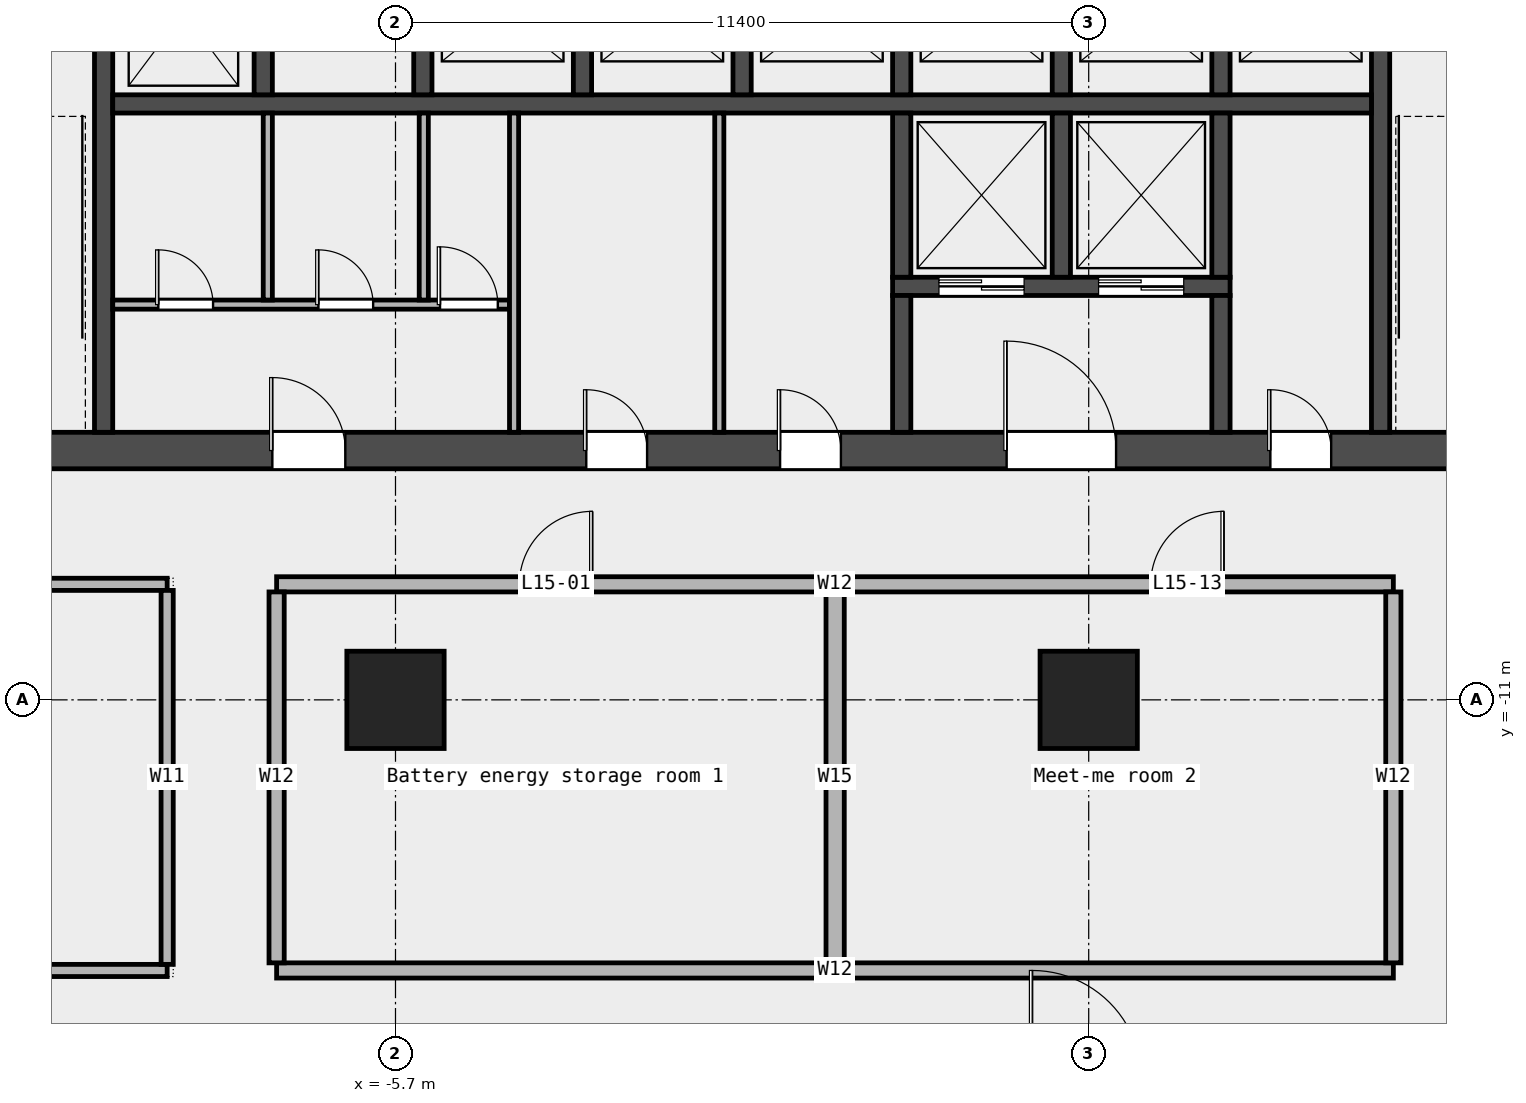
"""IFC4 building model, lengths in metres.
Left out: names, types, materials, properties, quantities, classifications, styles, units other than length and angle.
Written with IfcOpenShell. Run it as: python <this file> out.ifc"""

import sys

from ifc_helpers import new_model, si_unit, direction, frame, frame_2d, origin, origin_2d, place, context, subcontext, project, spatial, rectangle, extrude, element, fill, save


model = new_model("IFC4")
c1 = context("Model", 3, precision=1e-05, world=origin(), true_north=direction((0.0, 1.0)))
c2 = subcontext(c1, "Body", "Model", "MODEL_VIEW")
j1 = project(units=[si_unit("LENGTHUNIT", "METRE"), si_unit("PLANEANGLEUNIT", "RADIAN")], contexts=[c1])
p1 = place(None, origin())
s1 = spatial("IfcSite", under=j1, at=p1, CompositionType="ELEMENT")
p2 = place(p1, origin())
s2 = spatial("IfcBuilding", under=s1, at=p2, CompositionType="ELEMENT")
p3 = place(p2, frame((0.0, 0.0, 79.0)))
s3 = spatial("IfcBuildingStorey", under=s2, at=p3, CompositionType="ELEMENT", Elevation=79.0)
for number, where, z_axis, x_axis in (
    (1, (-5.7, -11.0, 0.0), (0.0, 0.0, 1.0), (1.0, 0.0, 0.0)),
    (2, (5.7, -11.0, 0.0), (0.0, 0.0, 1.0), (1.0, 0.0, 0.0)),
):
    element("IfcColumn", number, at=place(p3, frame(where, z_axis=z_axis, x_axis=x_axis)), inside=s3, PredefinedType="COLUMN", context=c2, shape_type="SweptSolid", body=[
        extrude(rectangle(XDim=1.6, YDim=1.6, at=origin_2d()), origin(), (0.0, 0.0, 1.0), 4.35),
    ])
p4 = place(p3, frame((-24.525, -15.45, 0.0), z_axis=(0.0, 0.0, 1.0), x_axis=(1.0, 0.0, 0.0)))
e3 = element("IfcWall", 3, at=p4, inside=s3, PredefinedType="PARTITIONING", context=c2, shape_type="SweptSolid", body=[
    extrude(rectangle(XDim=15.07, YDim=0.2, at=frame_2d((7.535, 0.0))), origin(), (0.0, 0.0, 1.0), 4.35),
])
p5 = place(p4, frame((6.785, 0.0, 0.0)))
e4 = element("IfcOpeningElement", 4, at=p5, cuts=e3, PredefinedType="OPENING", context=c2, shape_type="SweptSolid", body=[
    extrude(rectangle(XDim=1.5, YDim=2.1, at=frame_2d((0.75, 1.05))), frame((0.0, 0.112, 0.0), z_axis=(0.0, -1.0, 0.0), x_axis=(1.0, 0.0, 0.0)), (0.0, 0.0, 1.0), 0.224),
])
p6 = place(p3, frame((-7.655, -15.45, 0.0), z_axis=(0.0, 0.0, 1.0), x_axis=(1.0, 0.0, 0.0)))
e5 = element("IfcWall", 5, at=p6, inside=s3, PredefinedType="PARTITIONING", context=c2, shape_type="SweptSolid", body=[
    extrude(rectangle(XDim=18.365, YDim=0.25, at=frame_2d((9.183, 0.0))), origin(), (0.0, 0.0, 1.0), 4.35),
])
p7 = place(p3, frame((-16.3, -9.1, 0.0), z_axis=(0.0, 0.0, 1.0), x_axis=(1.0, 0.0, 0.0)))
e6 = element("IfcWall", 6, at=p7, inside=s3, PredefinedType="PARTITIONING", context=c2, shape_type="SweptSolid", body=[
    extrude(rectangle(XDim=6.845, YDim=0.2, at=frame_2d((3.422, 0.0))), origin(), (0.0, 0.0, 1.0), 4.35),
])
p8 = place(p3, frame((-7.655, -9.1, 0.0), z_axis=(0.0, 0.0, 1.0), x_axis=(1.0, 0.0, 0.0)))
e7 = element("IfcWall", 7, at=p8, inside=s3, PredefinedType="PARTITIONING", context=c2, shape_type="SweptSolid", body=[
    extrude(rectangle(XDim=18.365, YDim=0.25, at=frame_2d((9.183, 0.0))), origin(), (0.0, 0.0, 1.0), 4.35),
])
p9 = place(p8, frame((3.992, 0.0, 0.0)))
e8 = element("IfcOpeningElement", 8, at=p9, cuts=e7, PredefinedType="OPENING", context=c2, shape_type="SweptSolid", body=[
    extrude(rectangle(XDim=1.2, YDim=2.1, at=frame_2d((0.6, 1.05))), frame((0.0, 0.137, 0.0), z_axis=(0.0, -1.0, 0.0), x_axis=(1.0, 0.0, 0.0)), (0.0, 0.0, 1.0), 0.274),
])
p10 = place(p8, frame((14.375, 0.0, 0.0)))
e9 = element("IfcOpeningElement", 9, at=p10, cuts=e7, PredefinedType="OPENING", context=c2, shape_type="SweptSolid", body=[
    extrude(rectangle(XDim=1.2, YDim=2.1, at=frame_2d((0.6, 1.05))), frame((0.0, 0.137, 0.0), z_axis=(0.0, -1.0, 0.0), x_axis=(1.0, 0.0, 0.0)), (0.0, 0.0, 1.0), 0.274),
])
p11 = place(p3, frame((-9.455, -15.35, 0.0), z_axis=(0.0, 0.0, 1.0), x_axis=(0.0, 1.0, 0.0)))
e10 = element("IfcWall", 10, at=p11, inside=s3, PredefinedType="PARTITIONING", context=c2, shape_type="SweptSolid", body=[
    extrude(rectangle(XDim=6.15, YDim=0.2, at=frame_2d((3.075, 0.0))), origin(), (0.0, 0.0, 1.0), 4.35),
])
p12 = place(p3, frame((-7.655, -15.325, 0.0), z_axis=(0.0, 0.0, 1.0), x_axis=(0.0, 1.0, 0.0)))
e11 = element("IfcWall", 11, at=p12, inside=s3, PredefinedType="PARTITIONING", context=c2, shape_type="SweptSolid", body=[
    extrude(rectangle(XDim=6.1, YDim=0.25, at=frame_2d((3.05, 0.0))), origin(), (0.0, 0.0, 1.0), 4.35),
])
p13 = place(p3, frame((1.53, -15.325, 0.0), z_axis=(0.0, 0.0, 1.0), x_axis=(0.0, 1.0, 0.0)))
e12 = element("IfcWall", 12, at=p13, inside=s3, PredefinedType="PARTITIONING", context=c2, shape_type="SweptSolid", body=[
    extrude(rectangle(XDim=6.1, YDim=0.3, at=frame_2d((3.05, 0.0))), origin(), (0.0, 0.0, 1.0), 4.35),
])
p14 = place(p3, frame((10.71, -15.325, 0.0), z_axis=(0.0, 0.0, 1.0), x_axis=(0.0, 1.0, 0.0)))
e13 = element("IfcWall", 13, at=p14, inside=s3, PredefinedType="PARTITIONING", context=c2, shape_type="SweptSolid", body=[
    extrude(rectangle(XDim=6.1, YDim=0.25, at=frame_2d((3.05, 0.0))), origin(), (0.0, 0.0, 1.0), 4.35),
])
p15 = place(p3, frame((-14.4, -6.9, 0.0), z_axis=(0.0, 0.0, 1.0), x_axis=(1.0, 0.0, 0.0)))
e14 = element("IfcWall", 14, at=p15, inside=s3, PredefinedType="SHEAR", context=c2, shape_type="SweptSolid", body=[
    extrude(rectangle(XDim=28.8, YDim=0.6, at=frame_2d((14.4, 0.0))), origin(), (0.0, 0.0, 1.0), 4.5),
])
p16 = place(p15, frame((6.675, 0.0, 0.0)))
e15 = element("IfcOpeningElement", 15, at=p16, cuts=e14, PredefinedType="OPENING", context=c2, shape_type="SweptSolid", body=[
    extrude(rectangle(XDim=1.2, YDim=2.1, at=frame_2d((0.6, 1.05))), frame((0.0, 0.312, 0.0), z_axis=(0.0, -1.0, 0.0), x_axis=(1.0, 0.0, 0.0)), (0.0, 0.0, 1.0), 0.624),
])
p17 = place(p15, frame((11.837, 0.0, 0.0)))
e16 = element("IfcOpeningElement", 16, at=p17, cuts=e14, PredefinedType="OPENING", context=c2, shape_type="SweptSolid", body=[
    extrude(rectangle(XDim=1.0, YDim=2.1, at=frame_2d((0.5, 1.05))), frame((0.0, 0.312, 0.0), z_axis=(0.0, -1.0, 0.0), x_axis=(1.0, 0.0, 0.0)), (0.0, 0.0, 1.0), 0.624),
])
p18 = place(p15, frame((15.025, 0.0, 0.0)))
e17 = element("IfcOpeningElement", 17, at=p18, cuts=e14, PredefinedType="OPENING", context=c2, shape_type="SweptSolid", body=[
    extrude(rectangle(XDim=1.0, YDim=2.1, at=frame_2d((0.5, 1.05))), frame((0.0, 0.312, 0.0), z_axis=(0.0, -1.0, 0.0), x_axis=(1.0, 0.0, 0.0)), (0.0, 0.0, 1.0), 0.624),
])
p19 = place(p15, frame((18.75, 0.0, 0.0)))
e18 = element("IfcOpeningElement", 18, at=p19, cuts=e14, PredefinedType="OPENING", context=c2, shape_type="SweptSolid", body=[
    extrude(rectangle(XDim=1.8, YDim=2.1, at=frame_2d((0.9, 1.05))), frame((0.0, 0.312, 0.0), z_axis=(0.0, -1.0, 0.0), x_axis=(1.0, 0.0, 0.0)), (0.0, 0.0, 1.0), 0.624),
])
p20 = place(p15, frame((23.087, 0.0, 0.0)))
e19 = element("IfcOpeningElement", 19, at=p20, cuts=e14, PredefinedType="OPENING", context=c2, shape_type="SweptSolid", body=[
    extrude(rectangle(XDim=1.0, YDim=2.1, at=frame_2d((0.5, 1.05))), frame((0.0, 0.312, 0.0), z_axis=(0.0, -1.0, 0.0), x_axis=(1.0, 0.0, 0.0)), (0.0, 0.0, 1.0), 0.624),
])
for number, where, z_axis, x_axis in (
    (20, (-10.5, -6.6, 0.0), (0.0, 0.0, 1.0), (0.0, 1.0, 0.0)),
    (21, (10.5, -6.6, 0.0), (0.0, 0.0, 1.0), (0.0, 1.0, 0.0)),
):
    element("IfcWall", number, at=place(p3, frame(where, z_axis=z_axis, x_axis=x_axis)), inside=s3, PredefinedType="SHEAR", context=c2, shape_type="SweptSolid", body=[
        extrude(rectangle(XDim=8.55, YDim=0.3, at=frame_2d((4.275, 0.0))), origin(), (0.0, 0.0, 1.0), 4.5),
    ])
p21 = place(p3, frame((-10.35, -1.2, 0.0), z_axis=(0.0, 0.0, 1.0), x_axis=(1.0, 0.0, 0.0)))
e22 = element("IfcWall", 22, at=p21, inside=s3, PredefinedType="SOLIDWALL", context=c2, shape_type="SweptSolid", body=[
    extrude(rectangle(XDim=20.7, YDim=0.3, at=frame_2d((10.35, 0.0))), origin(), (0.0, 0.0, 1.0), 4.5),
])
for number, where, z_axis, x_axis in (
    (23, (-7.875, -1.05, 0.0), (0.0, 0.0, 1.0), (0.0, 1.0, 0.0)),
    (24, (-5.25, -1.05, 0.0), (0.0, 0.0, 1.0), (0.0, 1.0, 0.0)),
    (25, (-2.625, -1.05, 0.0), (0.0, 0.0, 1.0), (0.0, 1.0, 0.0)),
    (26, (0.0, -1.05, 0.0), (0.0, 0.0, 1.0), (0.0, 1.0, 0.0)),
    (27, (2.625, -1.05, 0.0), (0.0, 0.0, 1.0), (0.0, 1.0, 0.0)),
    (28, (5.25, -1.05, 0.0), (0.0, 0.0, 1.0), (0.0, 1.0, 0.0)),
    (29, (7.875, -1.05, 0.0), (0.0, 0.0, 1.0), (0.0, 1.0, 0.0)),
):
    element("IfcWall", number, at=place(p3, frame(where, z_axis=z_axis, x_axis=x_axis)), inside=s3, PredefinedType="SOLIDWALL", context=c2, shape_type="SweptSolid", body=[
        extrude(rectangle(XDim=2.7, YDim=0.3, at=frame_2d((1.35, 0.0))), origin(), (0.0, 0.0, 1.0), 4.5),
    ])
p22 = place(p3, frame((2.475, -4.2, 0.0), z_axis=(0.0, 0.0, 1.0), x_axis=(1.0, 0.0, 0.0)))
e30 = element("IfcWall", 30, at=p22, inside=s3, PredefinedType="SOLIDWALL", context=c2, shape_type="SweptSolid", body=[
    extrude(rectangle(XDim=5.55, YDim=0.3, at=frame_2d((2.775, 0.0))), origin(), (0.0, 0.0, 1.0), 4.5),
])
p23 = place(p22, frame((0.762, 0.0, 0.0)))
e31 = element("IfcOpeningElement", 31, at=p23, cuts=e30, PredefinedType="OPENING", context=c2, shape_type="SweptSolid", body=[
    extrude(rectangle(XDim=1.4, YDim=2.1, at=frame_2d((0.7, 1.05))), frame((0.0, 0.162, 0.0), z_axis=(0.0, -1.0, 0.0), x_axis=(1.0, 0.0, 0.0)), (0.0, 0.0, 1.0), 0.324),
])
p24 = place(p22, frame((3.387, 0.0, 0.0)))
e32 = element("IfcOpeningElement", 32, at=p24, cuts=e30, PredefinedType="OPENING", context=c2, shape_type="SweptSolid", body=[
    extrude(rectangle(XDim=1.4, YDim=2.1, at=frame_2d((0.7, 1.05))), frame((0.0, 0.162, 0.0), z_axis=(0.0, -1.0, 0.0), x_axis=(1.0, 0.0, 0.0)), (0.0, 0.0, 1.0), 0.324),
])
p25 = place(p3, frame((2.625, -4.05, 0.0), z_axis=(0.0, 0.0, 1.0), x_axis=(0.0, 1.0, 0.0)))
e33 = element("IfcWall", 33, at=p25, inside=s3, PredefinedType="SOLIDWALL", context=c2, shape_type="SweptSolid", body=[
    extrude(rectangle(XDim=2.7, YDim=0.3, at=frame_2d((1.35, 0.0))), origin(), (0.0, 0.0, 1.0), 4.5),
])
p26 = place(p3, frame((2.625, -6.6, 0.0), z_axis=(0.0, 0.0, 1.0), x_axis=(0.0, 1.0, 0.0)))
e34 = element("IfcWall", 34, at=p26, inside=s3, PredefinedType="SOLIDWALL", context=c2, shape_type="SweptSolid", body=[
    extrude(rectangle(XDim=2.25, YDim=0.3, at=frame_2d((1.125, 0.0))), origin(), (0.0, 0.0, 1.0), 4.5),
])
for number, where, z_axis, x_axis in (
    (35, (5.25, -4.05, 0.0), (0.0, 0.0, 1.0), (0.0, 1.0, 0.0)),
    (36, (7.875, -4.05, 0.0), (0.0, 0.0, 1.0), (0.0, 1.0, 0.0)),
):
    element("IfcWall", number, at=place(p3, frame(where, z_axis=z_axis, x_axis=x_axis)), inside=s3, PredefinedType="SOLIDWALL", context=c2, shape_type="SweptSolid", body=[
        extrude(rectangle(XDim=2.7, YDim=0.3, at=frame_2d((1.35, 0.0))), origin(), (0.0, 0.0, 1.0), 4.5),
    ])
p27 = place(p3, frame((7.875, -6.6, 0.0), z_axis=(0.0, 0.0, 1.0), x_axis=(0.0, 1.0, 0.0)))
e37 = element("IfcWall", 37, at=p27, inside=s3, PredefinedType="SOLIDWALL", context=c2, shape_type="SweptSolid", body=[
    extrude(rectangle(XDim=2.25, YDim=0.3, at=frame_2d((1.125, 0.0))), origin(), (0.0, 0.0, 1.0), 4.5),
])
p28 = place(p3, frame((-10.35, -4.5, 0.0), z_axis=(0.0, 0.0, 1.0), x_axis=(1.0, 0.0, 0.0)))
e38 = element("IfcWall", 38, at=p28, inside=s3, PredefinedType="PARTITIONING", context=c2, shape_type="SweptSolid", body=[
    extrude(rectangle(XDim=6.525, YDim=0.15, at=frame_2d((3.263, 0.0))), origin(), (0.0, 0.0, 1.0), 4.5),
])
p29 = place(p28, frame((0.75, 0.0, 0.0)))
e39 = element("IfcOpeningElement", 39, at=p29, cuts=e38, PredefinedType="OPENING", context=c2, shape_type="SweptSolid", body=[
    extrude(rectangle(XDim=0.9, YDim=2.1, at=frame_2d((0.45, 1.05))), frame((0.0, 0.087, 0.0), z_axis=(0.0, -1.0, 0.0), x_axis=(1.0, 0.0, 0.0)), (0.0, 0.0, 1.0), 0.174),
])
p30 = place(p28, frame((3.383, 0.0, 0.0)))
e40 = element("IfcOpeningElement", 40, at=p30, cuts=e38, PredefinedType="OPENING", context=c2, shape_type="SweptSolid", body=[
    extrude(rectangle(XDim=0.9, YDim=2.1, at=frame_2d((0.45, 1.05))), frame((0.0, 0.087, 0.0), z_axis=(0.0, -1.0, 0.0), x_axis=(1.0, 0.0, 0.0)), (0.0, 0.0, 1.0), 0.174),
])
p31 = place(p28, frame((5.383, 0.0, 0.0)))
e41 = element("IfcOpeningElement", 41, at=p31, cuts=e38, PredefinedType="OPENING", context=c2, shape_type="SweptSolid", body=[
    extrude(rectangle(XDim=0.95, YDim=2.1, at=frame_2d((0.475, 1.05))), frame((0.0, 0.087, 0.0), z_axis=(0.0, -1.0, 0.0), x_axis=(1.0, 0.0, 0.0)), (0.0, 0.0, 1.0), 0.174),
])
for number, where, z_axis, x_axis in (
    (42, (-7.8, -4.425, 0.0), (0.0, 0.0, 1.0), (0.0, 1.0, 0.0)),
    (43, (-5.235, -4.425, 0.0), (0.0, 0.0, 1.0), (0.0, 1.0, 0.0)),
):
    element("IfcWall", number, at=place(p3, frame(where, z_axis=z_axis, x_axis=x_axis)), inside=s3, PredefinedType="PARTITIONING", context=c2, shape_type="SweptSolid", body=[
        extrude(rectangle(XDim=3.075, YDim=0.15, at=frame_2d((1.538, 0.0))), origin(), (0.0, 0.0, 1.0), 4.5),
    ])
for number, where, z_axis, x_axis in (
    (44, (-3.75, -6.6, 0.0), (0.0, 0.0, 1.0), (0.0, 1.0, 0.0)),
    (45, (-0.375, -6.6, 0.0), (0.0, 0.0, 1.0), (0.0, 1.0, 0.0)),
):
    element("IfcWall", number, at=place(p3, frame(where, z_axis=z_axis, x_axis=x_axis)), inside=s3, PredefinedType="PARTITIONING", context=c2, shape_type="SweptSolid", body=[
        extrude(rectangle(XDim=5.25, YDim=0.15, at=frame_2d((2.625, 0.0))), origin(), (0.0, 0.0, 1.0), 4.5),
    ])
p32 = place(p9, origin())
e46 = element("IfcDoor", 46, at=p32, inside=s3, OperationType="SINGLE_SWING_RIGHT", PredefinedType="DOOR", context=c2, shape_type="SweptSolid", body=[
    extrude(rectangle(XDim=1.2, YDim=2.1, at=frame_2d((0.6, 1.05))), frame((0.0, 0.025, 0.0), z_axis=(0.0, -1.0, 0.0), x_axis=(1.0, 0.0, 0.0)), (0.0, 0.0, 1.0), 0.05),
])
fill(e8, e46)
p33 = place(p10, origin())
e47 = element("IfcDoor", 47, at=p33, inside=s3, OperationType="SINGLE_SWING_RIGHT", PredefinedType="DOOR", context=c2, shape_type="SweptSolid", body=[
    extrude(rectangle(XDim=1.2, YDim=2.1, at=frame_2d((0.6, 1.05))), frame((0.0, 0.025, 0.0), z_axis=(0.0, -1.0, 0.0), x_axis=(1.0, 0.0, 0.0)), (0.0, 0.0, 1.0), 0.05),
])
fill(e9, e47)
p34 = place(p23, origin())
e48 = element("IfcDoor", 48, at=p34, inside=s3, OperationType="DOUBLE_DOOR_SLIDING", PredefinedType="DOOR", context=c2, shape_type="SweptSolid", body=[
    extrude(rectangle(XDim=1.4, YDim=2.1, at=frame_2d((0.7, 1.05))), frame((0.0, 0.025, 0.0), z_axis=(0.0, -1.0, 0.0), x_axis=(1.0, 0.0, 0.0)), (0.0, 0.0, 1.0), 0.05),
])
fill(e31, e48)
p35 = place(p24, origin())
e49 = element("IfcDoor", 49, at=p35, inside=s3, OperationType="DOUBLE_DOOR_SLIDING", PredefinedType="DOOR", context=c2, shape_type="SweptSolid", body=[
    extrude(rectangle(XDim=1.4, YDim=2.1, at=frame_2d((0.7, 1.05))), frame((0.0, 0.025, 0.0), z_axis=(0.0, -1.0, 0.0), x_axis=(1.0, 0.0, 0.0)), (0.0, 0.0, 1.0), 0.05),
])
fill(e32, e49)
p36 = place(p16, origin())
e50 = element("IfcDoor", 50, at=p36, inside=s3, OperationType="SINGLE_SWING_LEFT", PredefinedType="DOOR", context=c2, shape_type="SweptSolid", body=[
    extrude(rectangle(XDim=1.2, YDim=2.1, at=frame_2d((0.6, 1.05))), frame((0.0, 0.025, 0.0), z_axis=(0.0, -1.0, 0.0), x_axis=(1.0, 0.0, 0.0)), (0.0, 0.0, 1.0), 0.05),
])
fill(e15, e50)
p37 = place(p29, origin())
e51 = element("IfcDoor", 51, at=p37, inside=s3, OperationType="SINGLE_SWING_LEFT", PredefinedType="DOOR", context=c2, shape_type="SweptSolid", body=[
    extrude(rectangle(XDim=0.9, YDim=2.1, at=frame_2d((0.45, 1.05))), frame((0.0, 0.025, 0.0), z_axis=(0.0, -1.0, 0.0), x_axis=(1.0, 0.0, 0.0)), (0.0, 0.0, 1.0), 0.05),
])
fill(e39, e51)
p38 = place(p30, origin())
e52 = element("IfcDoor", 52, at=p38, inside=s3, OperationType="SINGLE_SWING_LEFT", PredefinedType="DOOR", context=c2, shape_type="SweptSolid", body=[
    extrude(rectangle(XDim=0.9, YDim=2.1, at=frame_2d((0.45, 1.05))), frame((0.0, 0.025, 0.0), z_axis=(0.0, -1.0, 0.0), x_axis=(1.0, 0.0, 0.0)), (0.0, 0.0, 1.0), 0.05),
])
fill(e40, e52)
p39 = place(p31, origin())
e53 = element("IfcDoor", 53, at=p39, inside=s3, OperationType="SINGLE_SWING_LEFT", PredefinedType="DOOR", context=c2, shape_type="SweptSolid", body=[
    extrude(rectangle(XDim=0.95, YDim=2.1, at=frame_2d((0.475, 1.05))), frame((0.0, 0.025, 0.0), z_axis=(0.0, -1.0, 0.0), x_axis=(1.0, 0.0, 0.0)), (0.0, 0.0, 1.0), 0.05),
])
fill(e41, e53)
p40 = place(p17, origin())
e54 = element("IfcDoor", 54, at=p40, inside=s3, OperationType="SINGLE_SWING_LEFT", PredefinedType="DOOR", context=c2, shape_type="SweptSolid", body=[
    extrude(rectangle(XDim=1.0, YDim=2.1, at=frame_2d((0.5, 1.05))), frame((0.0, 0.025, 0.0), z_axis=(0.0, -1.0, 0.0), x_axis=(1.0, 0.0, 0.0)), (0.0, 0.0, 1.0), 0.05),
])
fill(e16, e54)
p41 = place(p18, origin())
e55 = element("IfcDoor", 55, at=p41, inside=s3, OperationType="SINGLE_SWING_LEFT", PredefinedType="DOOR", context=c2, shape_type="SweptSolid", body=[
    extrude(rectangle(XDim=1.0, YDim=2.1, at=frame_2d((0.5, 1.05))), frame((0.0, 0.025, 0.0), z_axis=(0.0, -1.0, 0.0), x_axis=(1.0, 0.0, 0.0)), (0.0, 0.0, 1.0), 0.05),
])
fill(e17, e55)
p42 = place(p19, origin())
e56 = element("IfcDoor", 56, at=p42, inside=s3, OperationType="DOUBLE_DOOR_SINGLE_SWING", PredefinedType="DOOR", context=c2, shape_type="SweptSolid", body=[
    extrude(rectangle(XDim=1.8, YDim=2.1, at=frame_2d((0.9, 1.05))), frame((0.0, 0.025, 0.0), z_axis=(0.0, -1.0, 0.0), x_axis=(1.0, 0.0, 0.0)), (0.0, 0.0, 1.0), 0.05),
])
fill(e18, e56)
p43 = place(p20, origin())
e57 = element("IfcDoor", 57, at=p43, inside=s3, OperationType="SINGLE_SWING_LEFT", PredefinedType="DOOR", context=c2, shape_type="SweptSolid", body=[
    extrude(rectangle(XDim=1.0, YDim=2.1, at=frame_2d((0.5, 1.05))), frame((0.0, 0.025, 0.0), z_axis=(0.0, -1.0, 0.0), x_axis=(1.0, 0.0, 0.0)), (0.0, 0.0, 1.0), 0.05),
])
fill(e19, e57)
save(model, sys.argv[1])
